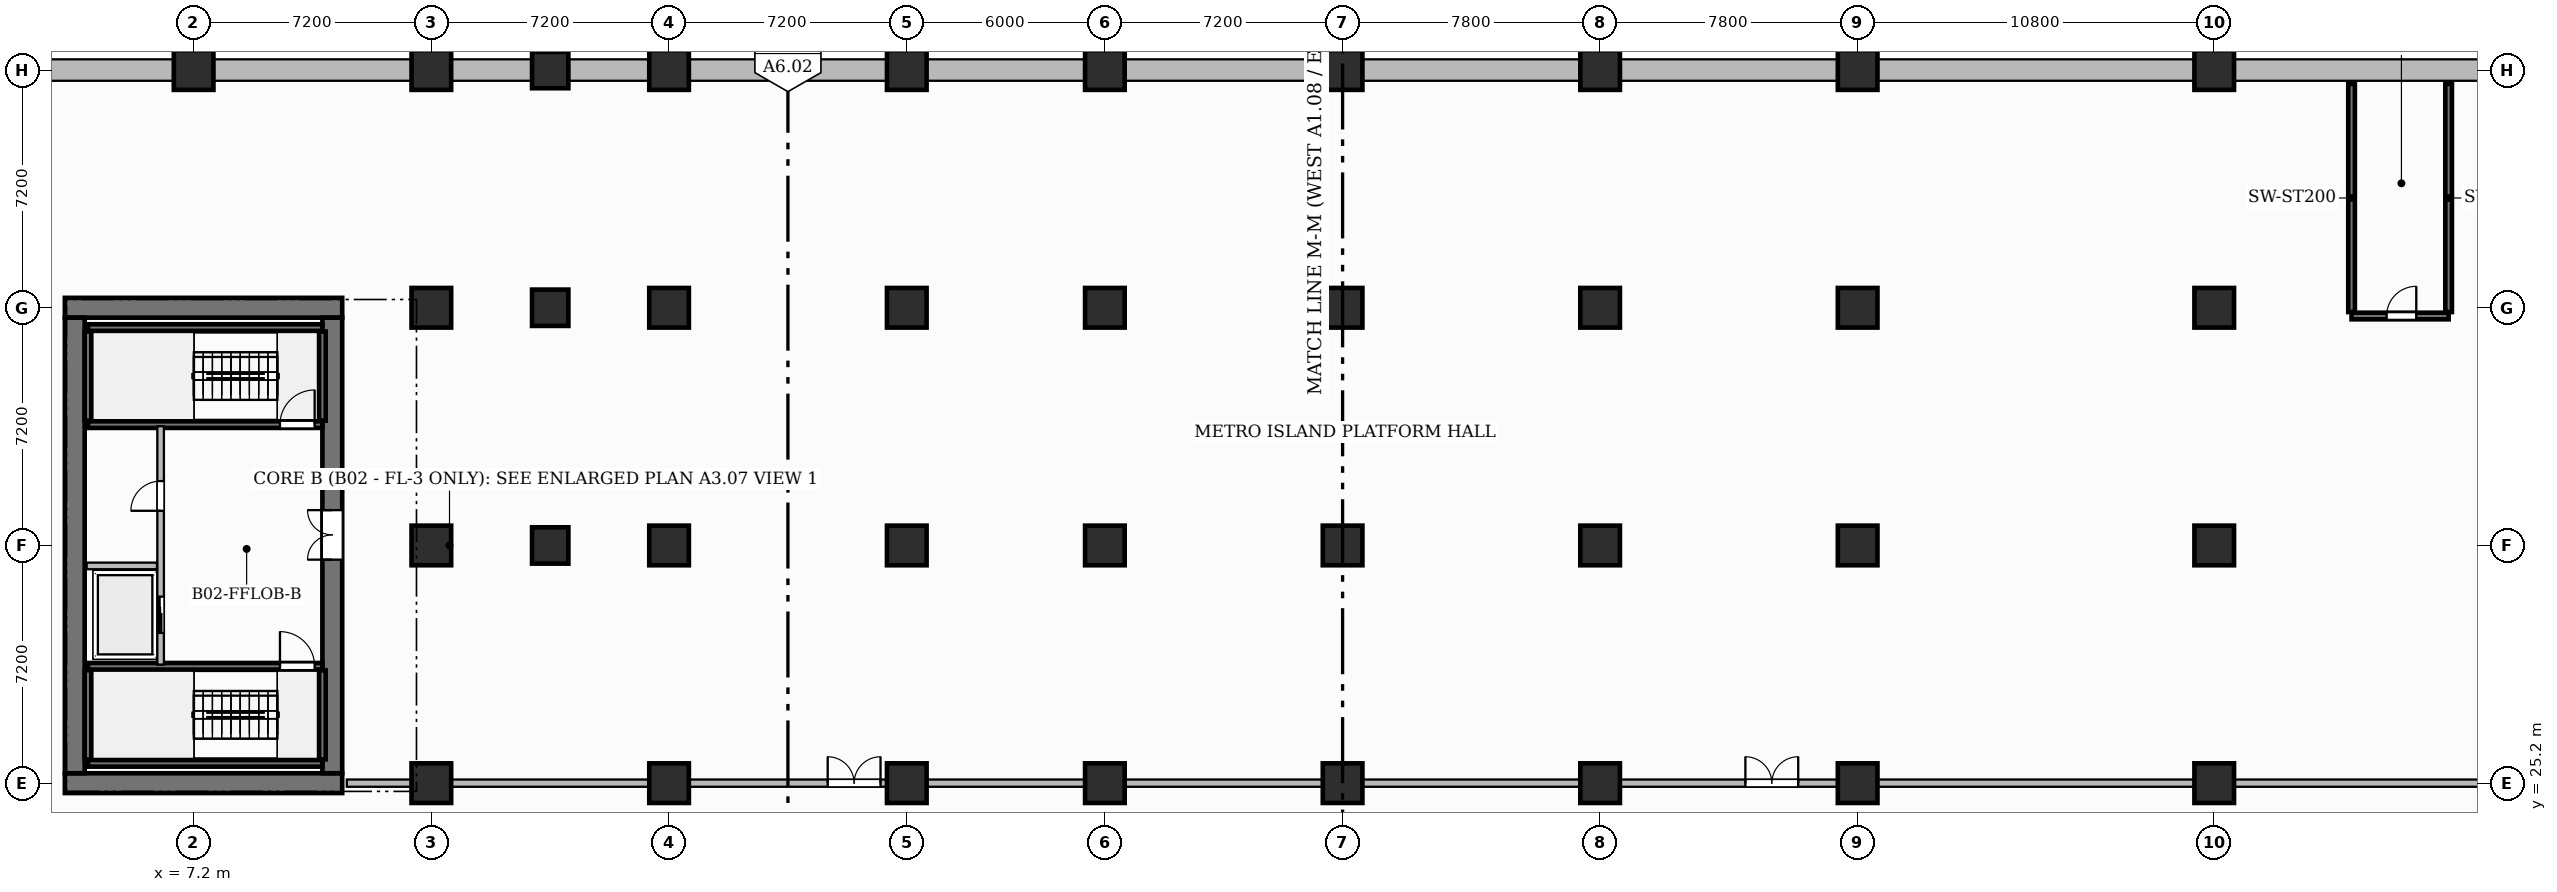
"""IFC4 building model, lengths in metres.
Left out: names, types, materials, properties, quantities, classifications, styles, units other than length and angle.
Written with IfcOpenShell. Run it as: python <this file> out.ifc"""

import sys

from ifc_helpers import new_model, si_unit, direction, frame, frame_2d, origin, origin_2d, place, context, subcontext, project, spatial, rectangle, extrude, source, transform, mapped, element, fill, save


model = new_model("IFC4")
c1 = context("Model", 3, precision=1e-05, world=origin(), true_north=direction((0.0, 1.0)))
c2 = subcontext(c1, "Body", "Model", "MODEL_VIEW")
j1 = project(units=[si_unit("LENGTHUNIT", "METRE"), si_unit("PLANEANGLEUNIT", "RADIAN")], contexts=[c1])
p1 = place(None, origin())
s1 = spatial("IfcSite", under=j1, at=p1, CompositionType="ELEMENT")
p2 = place(p1, origin())
s2 = spatial("IfcBuilding", under=s1, at=p2, CompositionType="ELEMENT")
p3 = place(p2, frame((0.0, 0.0, -13.0)))
s3 = spatial("IfcBuildingStorey", under=s2, at=p3, CompositionType="ELEMENT", Elevation=-13.0)
p4 = place(p3, frame((80.4, 46.8, -0.4), z_axis=(0.0, 0.0, 1.0), x_axis=(-1.0, 0.0, 0.0)))
e1 = element("IfcWall", 1, at=p4, inside=s3, PredefinedType="USERDEFINED", context=c2, shape_type="SweptSolid", body=[
    extrude(rectangle(XDim=85.2, YDim=0.65, at=frame_2d((42.6, 0.0))), origin(), (0.0, 0.0, 1.0), 6.9),
])
for number, where, z_axis, x_axis in (
    (2, (3.3, 25.2, -0.4), (0.0, 0.0, 1.0), (1.0, 0.0, 0.0)),
    (3, (3.3, 39.6, -0.4), (0.0, 0.0, 1.0), (1.0, 0.0, 0.0)),
):
    element("IfcWall", number, at=place(p3, frame(where, z_axis=z_axis, x_axis=x_axis)), inside=s3, PredefinedType="SHEAR", context=c2, shape_type="SweptSolid", body=[
        extrude(rectangle(XDim=8.4, YDim=0.6, at=frame_2d((4.2, 0.0))), origin(), (0.0, 0.0, 1.0), 6.9),
    ])
p5 = place(p3, frame((3.6, 25.5, -0.4), z_axis=(0.0, 0.0, 1.0), x_axis=(0.0, 1.0, 0.0)))
e4 = element("IfcWall", 4, at=p5, inside=s3, PredefinedType="SHEAR", context=c2, shape_type="SweptSolid", body=[
    extrude(rectangle(XDim=13.8, YDim=0.6, at=frame_2d((6.9, 0.0))), origin(), (0.0, 0.0, 1.0), 6.9),
])
p6 = place(p3, frame((11.4, 25.5, -0.4), z_axis=(0.0, 0.0, 1.0), x_axis=(0.0, 1.0, 0.0)))
e5 = element("IfcWall", 5, at=p6, inside=s3, PredefinedType="SHEAR", context=c2, shape_type="SweptSolid", body=[
    extrude(rectangle(XDim=13.8, YDim=0.6, at=frame_2d((6.9, 0.0))), origin(), (0.0, 0.0, 1.0), 6.9),
])
p7 = place(p6, frame((6.47, 0.0, 0.4)))
e6 = element("IfcOpeningElement", 6, at=p7, cuts=e5, PredefinedType="OPENING", context=c2, shape_type="SweptSolid", body=[
    extrude(rectangle(XDim=1.5, YDim=2.2, at=frame_2d((0.75, 1.1))), frame((0.0, 0.31, 0.0), z_axis=(0.0, -1.0, 0.0), x_axis=(1.0, 0.0, 0.0)), (0.0, 0.0, 1.0), 0.62),
])
m1 = source(origin(), c2, "Body", "SweptSolid", [
    extrude(rectangle(XDim=1.2, YDim=1.2, at=origin_2d()), origin(), (0.0, 0.0, 1.0), 6.9),
])
for number, where, z_axis, x_axis in (
    (7, (7.2, 46.8, -0.4), (0.0, 0.0, 1.0), (1.0, 0.0, 0.0)),
    (8, (14.4, 25.2, -0.4), (0.0, 0.0, 1.0), (1.0, 0.0, 0.0)),
    (9, (14.4, 32.4, -0.4), (0.0, 0.0, 1.0), (1.0, 0.0, 0.0)),
    (10, (14.4, 39.6, -0.4), (0.0, 0.0, 1.0), (1.0, 0.0, 0.0)),
    (11, (14.4, 46.8, -0.4), (0.0, 0.0, 1.0), (1.0, 0.0, 0.0)),
    (12, (21.6, 25.2, -0.4), (0.0, 0.0, 1.0), (1.0, 0.0, 0.0)),
    (13, (21.6, 32.4, -0.4), (0.0, 0.0, 1.0), (1.0, 0.0, 0.0)),
    (14, (21.6, 39.6, -0.4), (0.0, 0.0, 1.0), (1.0, 0.0, 0.0)),
    (15, (21.6, 46.8, -0.4), (0.0, 0.0, 1.0), (1.0, 0.0, 0.0)),
    (16, (28.8, 25.2, -0.4), (0.0, 0.0, 1.0), (1.0, 0.0, 0.0)),
    (17, (28.8, 32.4, -0.4), (0.0, 0.0, 1.0), (1.0, 0.0, 0.0)),
    (18, (28.8, 39.6, -0.4), (0.0, 0.0, 1.0), (1.0, 0.0, 0.0)),
    (19, (28.8, 46.8, -0.4), (0.0, 0.0, 1.0), (1.0, 0.0, 0.0)),
    (20, (34.8, 25.2, -0.4), (0.0, 0.0, 1.0), (1.0, 0.0, 0.0)),
    (21, (34.8, 32.4, -0.4), (0.0, 0.0, 1.0), (1.0, 0.0, 0.0)),
    (22, (34.8, 39.6, -0.4), (0.0, 0.0, 1.0), (1.0, 0.0, 0.0)),
    (23, (34.8, 46.8, -0.4), (0.0, 0.0, 1.0), (1.0, 0.0, 0.0)),
    (24, (42.0, 25.2, -0.4), (0.0, 0.0, 1.0), (1.0, 0.0, 0.0)),
    (25, (42.0, 32.4, -0.4), (0.0, 0.0, 1.0), (1.0, 0.0, 0.0)),
    (26, (42.0, 39.6, -0.4), (0.0, 0.0, 1.0), (1.0, 0.0, 0.0)),
    (27, (42.0, 46.8, -0.4), (0.0, 0.0, 1.0), (1.0, 0.0, 0.0)),
    (28, (49.8, 25.2, -0.4), (0.0, 0.0, 1.0), (1.0, 0.0, 0.0)),
    (29, (49.8, 32.4, -0.4), (0.0, 0.0, 1.0), (1.0, 0.0, 0.0)),
    (30, (49.8, 39.6, -0.4), (0.0, 0.0, 1.0), (1.0, 0.0, 0.0)),
    (31, (49.8, 46.8, -0.4), (0.0, 0.0, 1.0), (1.0, 0.0, 0.0)),
    (32, (57.6, 25.2, -0.4), (0.0, 0.0, 1.0), (1.0, 0.0, 0.0)),
    (33, (57.6, 32.4, -0.4), (0.0, 0.0, 1.0), (1.0, 0.0, 0.0)),
    (34, (57.6, 39.6, -0.4), (0.0, 0.0, 1.0), (1.0, 0.0, 0.0)),
    (35, (57.6, 46.8, -0.4), (0.0, 0.0, 1.0), (1.0, 0.0, 0.0)),
    (36, (68.4, 25.2, -0.4), (0.0, 0.0, 1.0), (1.0, 0.0, 0.0)),
    (37, (68.4, 32.4, -0.4), (0.0, 0.0, 1.0), (1.0, 0.0, 0.0)),
    (38, (68.4, 39.6, -0.4), (0.0, 0.0, 1.0), (1.0, 0.0, 0.0)),
    (39, (68.4, 46.8, -0.4), (0.0, 0.0, 1.0), (1.0, 0.0, 0.0)),
):
    element("IfcColumn", number, at=place(p3, frame(where, z_axis=z_axis, x_axis=x_axis)), inside=s3, PredefinedType="COLUMN", context=c2, shape_type="MappedRepresentation", body=[
        mapped(m1, transform((0.0, 0.0, 0.0), scale=1.0)),
    ])
m2 = source(origin(), c2, "Body", "SweptSolid", [
    extrude(rectangle(XDim=1.1, YDim=1.1, at=origin_2d()), origin(), (0.0, 0.0, 1.0), 6.9),
])
for number, where, z_axis, x_axis in (
    (40, (18.0, 32.4, -0.4), (0.0, 0.0, 1.0), (1.0, 0.0, 0.0)),
    (41, (18.0, 39.6, -0.4), (0.0, 0.0, 1.0), (1.0, 0.0, 0.0)),
    (42, (18.0, 46.8, -0.4), (0.0, 0.0, 1.0), (1.0, 0.0, 0.0)),
):
    element("IfcColumn", number, at=place(p3, frame(where, z_axis=z_axis, x_axis=x_axis)), inside=s3, PredefinedType="COLUMN", context=c2, shape_type="MappedRepresentation", body=[
        mapped(m2, transform((0.0, 0.0, 0.0), scale=1.0)),
    ])
p8 = place(p3, frame((4.0, 25.8, -0.4), z_axis=(0.0, 0.0, 1.0), x_axis=(1.0, 0.0, 0.0)))
e43 = element("IfcWall", 43, at=p8, inside=s3, PredefinedType="SHEAR", context=c2, shape_type="SweptSolid", body=[
    extrude(rectangle(XDim=7.1, YDim=0.2, at=frame_2d((3.55, 0.0))), origin(), (0.0, 0.0, 1.0), 6.9),
])
for number, where, z_axis, x_axis in (
    (44, (4.0, 25.92, -0.4), (0.0, 0.0, 1.0), (0.0, 1.0, 0.0)),
    (45, (11.1, 25.92, -0.4), (0.0, 0.0, 1.0), (0.0, 1.0, 0.0)),
):
    element("IfcWall", number, at=place(p3, frame(where, z_axis=z_axis, x_axis=x_axis)), inside=s3, PredefinedType="SHEAR", context=c2, shape_type="SweptSolid", body=[
        extrude(rectangle(XDim=2.7, YDim=0.2, at=frame_2d((1.35, 0.0))), origin(), (0.0, 0.0, 1.0), 6.9),
    ])
p9 = place(p3, frame((4.0, 28.74, -0.4), z_axis=(0.0, 0.0, 1.0), x_axis=(1.0, 0.0, 0.0)))
e46 = element("IfcWall", 46, at=p9, inside=s3, PredefinedType="SHEAR", context=c2, shape_type="SweptSolid", body=[
    extrude(rectangle(XDim=7.1, YDim=0.2, at=frame_2d((3.55, 0.0))), origin(), (0.0, 0.0, 1.0), 6.9),
])
p10 = place(p9, frame((5.815, 0.0, 0.4)))
e47 = element("IfcOpeningElement", 47, at=p10, cuts=e46, PredefinedType="OPENING", context=c2, shape_type="SweptSolid", body=[
    extrude(rectangle(XDim=1.05, YDim=2.2, at=frame_2d((0.525, 1.1))), frame((0.0, 0.11, 0.0), z_axis=(0.0, -1.0, 0.0), x_axis=(1.0, 0.0, 0.0)), (0.0, 0.0, 1.0), 0.22),
])
p11 = place(p3, frame((4.0, 39.0, -0.4), z_axis=(0.0, 0.0, 1.0), x_axis=(1.0, 0.0, 0.0)))
e48 = element("IfcWall", 48, at=p11, inside=s3, PredefinedType="SHEAR", context=c2, shape_type="SweptSolid", body=[
    extrude(rectangle(XDim=7.1, YDim=0.2, at=frame_2d((3.55, 0.0))), origin(), (0.0, 0.0, 1.0), 6.9),
])
for number, where, z_axis, x_axis in (
    (49, (4.0, 36.18, -0.4), (0.0, 0.0, 1.0), (0.0, 1.0, 0.0)),
    (50, (11.1, 36.18, -0.4), (0.0, 0.0, 1.0), (0.0, 1.0, 0.0)),
):
    element("IfcWall", number, at=place(p3, frame(where, z_axis=z_axis, x_axis=x_axis)), inside=s3, PredefinedType="SHEAR", context=c2, shape_type="SweptSolid", body=[
        extrude(rectangle(XDim=2.7, YDim=0.2, at=frame_2d((1.35, 0.0))), origin(), (0.0, 0.0, 1.0), 6.9),
    ])
p12 = place(p3, frame((4.0, 36.06, -0.4), z_axis=(0.0, 0.0, 1.0), x_axis=(1.0, 0.0, 0.0)))
e51 = element("IfcWall", 51, at=p12, inside=s3, PredefinedType="SHEAR", context=c2, shape_type="SweptSolid", body=[
    extrude(rectangle(XDim=7.1, YDim=0.2, at=frame_2d((3.55, 0.0))), origin(), (0.0, 0.0, 1.0), 6.9),
])
p13 = place(p12, frame((5.815, 0.0, 0.4)))
e52 = element("IfcOpeningElement", 52, at=p13, cuts=e51, PredefinedType="OPENING", context=c2, shape_type="SweptSolid", body=[
    extrude(rectangle(XDim=1.05, YDim=2.2, at=frame_2d((0.525, 1.1))), frame((0.0, 0.11, 0.0), z_axis=(0.0, -1.0, 0.0), x_axis=(1.0, 0.0, 0.0)), (0.0, 0.0, 1.0), 0.22),
])
p14 = place(p3, frame((6.2, 28.79, 0.0), z_axis=(0.0, 0.0, 1.0), x_axis=(0.0, 1.0, 0.0)))
e53 = element("IfcWall", 53, at=p14, inside=s3, PredefinedType="PARTITIONING", context=c2, shape_type="SweptSolid", body=[
    extrude(rectangle(XDim=7.22, YDim=0.2, at=frame_2d((3.61, 0.0))), origin(), (0.0, 0.0, 1.0), 6.1),
])
p15 = place(p14, frame((4.66, 0.0, 0.0)))
e54 = element("IfcOpeningElement", 54, at=p15, cuts=e53, PredefinedType="OPENING", context=c2, shape_type="SweptSolid", body=[
    extrude(rectangle(XDim=0.9, YDim=2.1, at=frame_2d((0.45, 1.05))), frame((0.0, 0.11, 0.0), z_axis=(0.0, -1.0, 0.0), x_axis=(1.0, 0.0, 0.0)), (0.0, 0.0, 1.0), 0.22),
])
p16 = place(p14, frame((0.96, 0.0, 0.0)))
e55 = element("IfcOpeningElement", 55, at=p16, cuts=e53, PredefinedType="OPENING", context=c2, shape_type="SweptSolid", body=[
    extrude(rectangle(XDim=1.1, YDim=2.2, at=frame_2d((0.55, 1.1))), frame((0.0, 0.11, 0.0), z_axis=(0.0, -1.0, 0.0), x_axis=(1.0, 0.0, 0.0)), (0.0, 0.0, 1.0), 0.22),
])
p17 = place(p3, frame((3.96, 31.78, 0.0), z_axis=(0.0, 0.0, 1.0), x_axis=(1.0, 0.0, 0.0)))
e56 = element("IfcWall", 56, at=p17, inside=s3, PredefinedType="PARTITIONING", context=c2, shape_type="SweptSolid", body=[
    extrude(rectangle(XDim=2.13, YDim=0.2, at=frame_2d((1.065, 0.0))), origin(), (0.0, 0.0, 1.0), 6.1),
])
for number, where, z_axis, x_axis in (
    (57, (72.56, 39.47, -0.4), (0.0, 0.0, 1.0), (0.0, 1.0, 0.0)),
    (58, (75.5, 39.47, -0.4), (0.0, 0.0, 1.0), (0.0, 1.0, 0.0)),
):
    element("IfcWall", number, at=place(p3, frame(where, z_axis=z_axis, x_axis=x_axis)), inside=s3, PredefinedType="SHEAR", context=c2, shape_type="SweptSolid", body=[
        extrude(rectangle(XDim=6.91, YDim=0.2, at=frame_2d((3.455, 0.0))), origin(), (0.0, 0.0, 1.0), 6.9),
    ])
p18 = place(p3, frame((72.56, 39.35, -0.4), z_axis=(0.0, 0.0, 1.0), x_axis=(1.0, 0.0, 0.0)))
e59 = element("IfcWall", 59, at=p18, inside=s3, PredefinedType="SHEAR", context=c2, shape_type="SweptSolid", body=[
    extrude(rectangle(XDim=2.94, YDim=0.2, at=frame_2d((1.47, 0.0))), origin(), (0.0, 0.0, 1.0), 6.9),
])
p19 = place(p18, frame((1.06, 0.0, 0.4)))
e60 = element("IfcOpeningElement", 60, at=p19, cuts=e59, PredefinedType="OPENING", context=c2, shape_type="SweptSolid", body=[
    extrude(rectangle(XDim=0.9, YDim=2.1, at=frame_2d((0.45, 1.05))), frame((0.0, 0.11, 0.0), z_axis=(0.0, -1.0, 0.0), x_axis=(1.0, 0.0, 0.0)), (0.0, 0.0, 1.0), 0.22),
])
p20 = place(p3, frame((11.84, 25.2, 0.0), z_axis=(0.0, 0.0, 1.0), x_axis=(1.0, 0.0, 0.0)))
e61 = element("IfcWall", 61, at=p20, inside=s3, PredefinedType="PARTITIONING", context=c2, shape_type="SweptSolid", body=[
    extrude(rectangle(XDim=68.227, YDim=0.22, at=frame_2d((34.113, 0.0))), origin(), (0.0, 0.0, 1.0), 5.185),
])
p21 = place(p20, frame((14.565, 0.0, 0.0)))
e62 = element("IfcOpeningElement", 62, at=p21, cuts=e61, PredefinedType="OPENING", context=c2, shape_type="SweptSolid", body=[
    extrude(rectangle(XDim=1.6, YDim=2.4, at=frame_2d((0.8, 1.2))), frame((0.0, 0.12, 0.0), z_axis=(0.0, -1.0, 0.0), x_axis=(1.0, 0.0, 0.0)), (0.0, 0.0, 1.0), 0.24),
])
p22 = place(p20, frame((42.36, 0.0, 0.0)))
e63 = element("IfcOpeningElement", 63, at=p22, cuts=e61, PredefinedType="OPENING", context=c2, shape_type="SweptSolid", body=[
    extrude(rectangle(XDim=1.6, YDim=2.4, at=frame_2d((0.8, 1.2))), frame((0.0, 0.12, 0.0), z_axis=(0.0, -1.0, 0.0), x_axis=(1.0, 0.0, 0.0)), (0.0, 0.0, 1.0), 0.24),
])
m3 = source(origin(), c2, "Body", "SweptSolid", [
    extrude(rectangle(XDim=1.05, YDim=2.2, at=frame_2d((0.525, 1.1))), frame((0.0, 0.025, 0.0), z_axis=(0.0, -1.0, 0.0), x_axis=(1.0, 0.0, 0.0)), (0.0, 0.0, 1.0), 0.05),
])
p23 = place(p10, origin())
e64 = element("IfcDoor", 64, at=p23, inside=s3, OperationType="SINGLE_SWING_LEFT", PredefinedType="DOOR", context=c2, shape_type="MappedRepresentation", body=[
    mapped(m3, transform((0.0, 0.0, 0.0), scale=1.0)),
])
fill(e47, e64)
p24 = place(p13, origin())
e65 = element("IfcDoor", 65, at=p24, inside=s3, OperationType="SINGLE_SWING_RIGHT", PredefinedType="DOOR", context=c2, shape_type="MappedRepresentation", body=[
    mapped(m3, transform((0.0, 0.0, 0.0), scale=1.0)),
])
fill(e52, e65)
m4 = source(origin(), c2, "Body", "SweptSolid", [
    extrude(rectangle(XDim=0.9, YDim=2.1, at=frame_2d((0.45, 1.05))), frame((0.0, 0.025, 0.0), z_axis=(0.0, -1.0, 0.0), x_axis=(1.0, 0.0, 0.0)), (0.0, 0.0, 1.0), 0.05),
])
p25 = place(p15, origin())
e66 = element("IfcDoor", 66, at=p25, inside=s3, OperationType="SINGLE_SWING_LEFT", PredefinedType="DOOR", context=c2, shape_type="MappedRepresentation", body=[
    mapped(m4, transform((0.0, 0.0, 0.0), scale=1.0)),
])
fill(e54, e66)
m5 = source(origin(), c2, "Body", "SweptSolid", [
    extrude(rectangle(XDim=1.5, YDim=2.2, at=frame_2d((0.75, 1.1))), frame((0.0, 0.025, 0.0), z_axis=(0.0, -1.0, 0.0), x_axis=(1.0, 0.0, 0.0)), (0.0, 0.0, 1.0), 0.05),
])
p26 = place(p7, origin())
e67 = element("IfcDoor", 67, at=p26, inside=s3, OperationType="DOUBLE_DOOR_SINGLE_SWING", PredefinedType="DOOR", context=c2, shape_type="MappedRepresentation", body=[
    mapped(m5, transform((0.0, 0.0, 0.0), scale=1.0)),
])
fill(e6, e67)
p27 = place(p19, origin())
e68 = element("IfcDoor", 68, at=p27, inside=s3, OperationType="SINGLE_SWING_RIGHT", PredefinedType="DOOR", context=c2, shape_type="MappedRepresentation", body=[
    mapped(m4, transform((0.0, 0.0, 0.0), scale=1.0)),
])
fill(e60, e68)
m6 = source(origin(), c2, "Body", "SweptSolid", [
    extrude(rectangle(XDim=1.6, YDim=2.4, at=frame_2d((0.8, 1.2))), frame((0.0, 0.025, 0.0), z_axis=(0.0, -1.0, 0.0), x_axis=(1.0, 0.0, 0.0)), (0.0, 0.0, 1.0), 0.05),
])
p28 = place(p21, origin())
e69 = element("IfcDoor", 69, at=p28, inside=s3, OperationType="DOUBLE_DOOR_SINGLE_SWING", PredefinedType="DOOR", context=c2, shape_type="MappedRepresentation", body=[
    mapped(m6, transform((0.0, 0.0, 0.0), scale=1.0)),
])
fill(e62, e69)
p29 = place(p22, origin())
e70 = element("IfcDoor", 70, at=p29, inside=s3, OperationType="DOUBLE_DOOR_SINGLE_SWING", PredefinedType="DOOR", context=c2, shape_type="MappedRepresentation", body=[
    mapped(m6, transform((0.0, 0.0, 0.0), scale=1.0)),
])
fill(e63, e70)
m7 = source(origin(), c2, "Body", "SweptSolid", [
    extrude(rectangle(XDim=1.1, YDim=2.2, at=frame_2d((0.55, 1.1))), frame((0.0, 0.025, 0.0), z_axis=(0.0, -1.0, 0.0), x_axis=(1.0, 0.0, 0.0)), (0.0, 0.0, 1.0), 0.05),
])
p30 = place(p16, origin())
e71 = element("IfcDoor", 71, at=p30, inside=s3, OperationType="SLIDING_TO_LEFT", PredefinedType="DOOR", context=c2, shape_type="MappedRepresentation", body=[
    mapped(m7, transform((0.0, 0.0, 0.0), scale=1.0)),
])
fill(e55, e71)
save(model, sys.argv[1])
